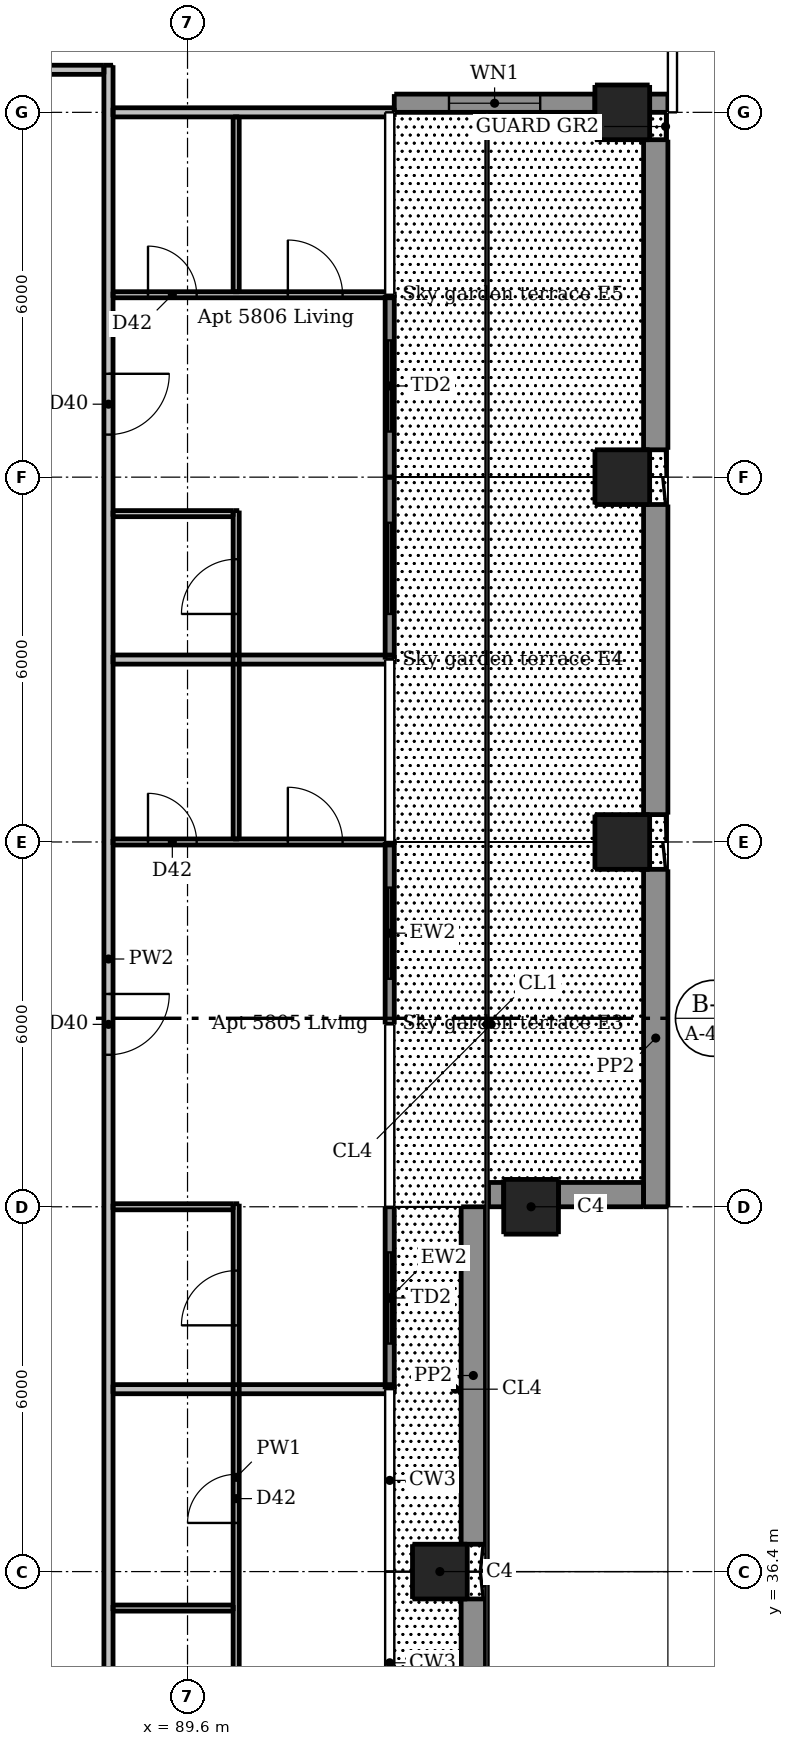
"""IFC4 building model, lengths in metres.
Left out: names, types, materials, properties, quantities, classifications, styles, units other than length and angle.
Written with IfcOpenShell. Run it as: python <this file> out.ifc"""

import sys

from ifc_helpers import new_model, si_unit, direction, frame, frame_2d, origin, origin_2d, place, context, subcontext, project, spatial, rectangle, extrude, element, fill, save


model = new_model("IFC4")
c1 = context("Model", 3, precision=1e-05, world=origin(), true_north=direction((0.0, 1.0)))
c2 = subcontext(c1, "Body", "Model", "MODEL_VIEW")
j1 = project(units=[si_unit("LENGTHUNIT", "METRE"), si_unit("PLANEANGLEUNIT", "RADIAN")], contexts=[c1])
p1 = place(None, origin())
s1 = spatial("IfcSite", under=j1, at=p1, CompositionType="ELEMENT")
p2 = place(p1, origin())
s2 = spatial("IfcBuilding", under=s1, at=p2, CompositionType="ELEMENT")
p3 = place(p2, frame((0.0, 0.0, 216.7)))
s3 = spatial("IfcBuildingStorey", under=s2, at=p3, CompositionType="ELEMENT", Elevation=216.7)
for number, where, z_axis, x_axis in (
    (1, (93.75, 36.4, 0.0), (0.0, 0.0, 1.0), (1.0, 0.0, 0.0)),
    (2, (95.25, 42.4, 0.0), (0.0, 0.0, 1.0), (1.0, 0.0, 0.0)),
    (3, (96.75, 48.4, 0.0), (0.0, 0.0, 1.0), (1.0, 0.0, 0.0)),
    (4, (96.75, 54.4, 0.0), (0.0, 0.0, 1.0), (1.0, 0.0, 0.0)),
):
    element("IfcColumn", number, at=place(p3, frame(where, z_axis=z_axis, x_axis=x_axis)), inside=s3, PredefinedType="COLUMN", context=c2, shape_type="SweptSolid", body=[
        extrude(rectangle(XDim=0.9, YDim=0.9, at=origin_2d()), origin(), (0.0, 0.0, 1.0), 3.3),
    ])
p4 = place(p3, frame((96.75, 60.4, 0.0), z_axis=(0.0, 0.0, 1.0), x_axis=(1.0, 0.0, 0.0)))
e5 = element("IfcColumn", 5, at=p4, inside=s3, PredefinedType="COLUMN", context=c2, shape_type="SweptSolid", body=[
    extrude(rectangle(XDim=0.9, YDim=0.9, at=origin_2d()), origin(), (0.0, 0.0, 1.0), 3.05),
])
p5 = place(p3, frame((93.0, 60.55, 0.0), z_axis=(0.0, 0.0, 1.0), x_axis=(1.0, 0.0, 0.0)))
e6 = element("IfcWall", 6, at=p5, inside=s3, PredefinedType="SOLIDWALL", context=c2, shape_type="SweptSolid", body=[
    extrude(rectangle(XDim=3.3, YDim=0.3, at=frame_2d((1.65, 0.0))), origin(), (0.0, 0.0, 1.0), 3.05),
])
p6 = place(p5, frame((0.9, 0.0, 0.9)))
e7 = element("IfcOpeningElement", 7, at=p6, cuts=e6, PredefinedType="OPENING", context=c2, shape_type="SweptSolid", body=[
    extrude(rectangle(XDim=1.5, YDim=1.5, at=frame_2d((0.75, 0.75))), frame((0.0, 0.16, 0.0), z_axis=(0.0, -1.0, 0.0), x_axis=(1.0, 0.0, 0.0)), (0.0, 0.0, 1.0), 0.32),
])
p7 = place(p3, frame((97.2, 60.55, 0.0), z_axis=(0.0, 0.0, 1.0), x_axis=(1.0, 0.0, 0.0)))
e8 = element("IfcWall", 8, at=p7, inside=s3, PredefinedType="SOLIDWALL", context=c2, shape_type="SweptSolid", body=[
    extrude(rectangle(XDim=0.3, YDim=0.3, at=frame_2d((0.15, 0.0))), origin(), (0.0, 0.0, 1.0), 3.05),
])
p8 = place(p3, frame((92.925, 39.4, 0.0), z_axis=(0.0, 0.0, 1.0), x_axis=(0.0, 1.0, 0.0)))
e9 = element("IfcWall", 9, at=p8, inside=s3, PredefinedType="SOLIDWALL", context=c2, shape_type="SweptSolid", body=[
    extrude(rectangle(XDim=3.0, YDim=0.15, at=frame_2d((1.5, 0.0))), origin(), (0.0, 0.0, 1.0), 3.05),
])
p9 = place(p8, frame((0.75, 0.0, 0.0)))
e10 = element("IfcOpeningElement", 10, at=p9, cuts=e9, PredefinedType="OPENING", context=c2, shape_type="SweptSolid", body=[
    extrude(rectangle(XDim=1.5, YDim=2.4, at=frame_2d((0.75, 1.2))), frame((0.0, 0.085, 0.0), z_axis=(0.0, -1.0, 0.0), x_axis=(1.0, 0.0, 0.0)), (0.0, 0.0, 1.0), 0.17),
])
p10 = place(p3, frame((92.925, 45.4, 0.0), z_axis=(0.0, 0.0, 1.0), x_axis=(0.0, 1.0, 0.0)))
e11 = element("IfcWall", 11, at=p10, inside=s3, PredefinedType="SOLIDWALL", context=c2, shape_type="SweptSolid", body=[
    extrude(rectangle(XDim=3.0, YDim=0.15, at=frame_2d((1.5, 0.0))), origin(), (0.0, 0.0, 1.0), 3.05),
])
p11 = place(p10, frame((0.75, 0.0, 0.0)))
e12 = element("IfcOpeningElement", 12, at=p11, cuts=e11, PredefinedType="OPENING", context=c2, shape_type="SweptSolid", body=[
    extrude(rectangle(XDim=1.5, YDim=2.4, at=frame_2d((0.75, 1.2))), frame((0.0, 0.085, 0.0), z_axis=(0.0, -1.0, 0.0), x_axis=(1.0, 0.0, 0.0)), (0.0, 0.0, 1.0), 0.17),
])
p12 = place(p3, frame((92.925, 51.4, 0.0), z_axis=(0.0, 0.0, 1.0), x_axis=(0.0, 1.0, 0.0)))
e13 = element("IfcWall", 13, at=p12, inside=s3, PredefinedType="SOLIDWALL", context=c2, shape_type="SweptSolid", body=[
    extrude(rectangle(XDim=3.0, YDim=0.15, at=frame_2d((1.5, 0.0))), origin(), (0.0, 0.0, 1.0), 3.05),
])
p13 = place(p12, frame((0.75, 0.0, 0.0)))
e14 = element("IfcOpeningElement", 14, at=p13, cuts=e13, PredefinedType="OPENING", context=c2, shape_type="SweptSolid", body=[
    extrude(rectangle(XDim=1.5, YDim=2.4, at=frame_2d((0.75, 1.2))), frame((0.0, 0.085, 0.0), z_axis=(0.0, -1.0, 0.0), x_axis=(1.0, 0.0, 0.0)), (0.0, 0.0, 1.0), 0.17),
])
p14 = place(p3, frame((92.925, 54.4, 0.0), z_axis=(0.0, 0.0, 1.0), x_axis=(0.0, 1.0, 0.0)))
e15 = element("IfcWall", 15, at=p14, inside=s3, PredefinedType="SOLIDWALL", context=c2, shape_type="SweptSolid", body=[
    extrude(rectangle(XDim=3.0, YDim=0.15, at=frame_2d((1.5, 0.0))), origin(), (0.0, 0.0, 1.0), 3.05),
])
p15 = place(p14, frame((0.75, 0.0, 0.0)))
e16 = element("IfcOpeningElement", 16, at=p15, cuts=e15, PredefinedType="OPENING", context=c2, shape_type="SweptSolid", body=[
    extrude(rectangle(XDim=1.5, YDim=2.4, at=frame_2d((0.75, 1.2))), frame((0.0, 0.085, 0.0), z_axis=(0.0, -1.0, 0.0), x_axis=(1.0, 0.0, 0.0)), (0.0, 0.0, 1.0), 0.17),
])
p16 = place(p3, frame((94.3, 30.85, 0.03), z_axis=(0.0, 0.0, 1.0), x_axis=(0.0, 1.0, 0.0)))
e17 = element("IfcWall", 17, at=p16, inside=s3, PredefinedType="PARAPET", context=c2, shape_type="SweptSolid", body=[
    extrude(rectangle(XDim=5.1, YDim=0.4, at=frame_2d((2.55, 0.0))), origin(), (0.0, 0.0, 1.0), 1.1),
])
p17 = place(p3, frame((94.3, 36.85, 0.03), z_axis=(0.0, 0.0, 1.0), x_axis=(0.0, 1.0, 0.0)))
e18 = element("IfcWall", 18, at=p17, inside=s3, PredefinedType="PARAPET", context=c2, shape_type="SweptSolid", body=[
    extrude(rectangle(XDim=5.55, YDim=0.4, at=frame_2d((2.775, 0.0))), origin(), (0.0, 0.0, 1.0), 1.1),
])
p18 = place(p3, frame((97.3, 42.4, 0.03), z_axis=(0.0, 0.0, 1.0), x_axis=(0.0, 1.0, 0.0)))
e19 = element("IfcWall", 19, at=p18, inside=s3, PredefinedType="PARAPET", context=c2, shape_type="SweptSolid", body=[
    extrude(rectangle(XDim=5.55, YDim=0.4, at=frame_2d((2.775, 0.0))), origin(), (0.0, 0.0, 1.0), 1.1),
])
p19 = place(p3, frame((94.55, 42.6, 0.03), z_axis=(0.0, 0.0, 1.0), x_axis=(1.0, 0.0, 0.0)))
e20 = element("IfcWall", 20, at=p19, inside=s3, PredefinedType="PARAPET", context=c2, shape_type="SweptSolid", body=[
    extrude(rectangle(XDim=0.25, YDim=0.4, at=frame_2d((0.125, 0.0))), origin(), (0.0, 0.0, 1.0), 1.1),
])
p20 = place(p3, frame((95.7, 42.6, 0.03), z_axis=(0.0, 0.0, 1.0), x_axis=(1.0, 0.0, 0.0)))
e21 = element("IfcWall", 21, at=p20, inside=s3, PredefinedType="PARAPET", context=c2, shape_type="SweptSolid", body=[
    extrude(rectangle(XDim=1.4, YDim=0.4, at=frame_2d((0.7, 0.0))), origin(), (0.0, 0.0, 1.0), 1.1),
])
for number, where, z_axis, x_axis in (
    (22, (97.3, 48.85, 0.03), (0.0, 0.0, 1.0), (0.0, 1.0, 0.0)),
    (23, (97.3, 54.85, 0.03), (0.0, 0.0, 1.0), (0.0, 1.0, 0.0)),
):
    element("IfcWall", number, at=place(p3, frame(where, z_axis=z_axis, x_axis=x_axis)), inside=s3, PredefinedType="PARAPET", context=c2, shape_type="SweptSolid", body=[
        extrude(rectangle(XDim=5.1, YDim=0.4, at=frame_2d((2.55, 0.0))), origin(), (0.0, 0.0, 1.0), 1.1),
    ])
p21 = place(p3, frame((90.4, 33.45, 0.0), z_axis=(0.0, 0.0, 1.0), x_axis=(0.0, 1.0, 0.0)))
e24 = element("IfcWall", 24, at=p21, inside=s3, PredefinedType="PARTITIONING", context=c2, shape_type="SweptSolid", body=[
    extrude(rectangle(XDim=9.0, YDim=0.1, at=frame_2d((4.5, 0.0))), origin(), (0.0, 0.0, 1.0), 3.05),
])
p22 = place(p21, frame((3.75, 0.0, 0.0)))
e25 = element("IfcOpeningElement", 25, at=p22, cuts=e24, PredefinedType="OPENING", context=c2, shape_type="SweptSolid", body=[
    extrude(rectangle(XDim=0.8, YDim=2.1, at=frame_2d((0.4, 1.05))), frame((0.0, 0.06, 0.0), z_axis=(0.0, -1.0, 0.0), x_axis=(1.0, 0.0, 0.0)), (0.0, 0.0, 1.0), 0.12),
])
p23 = place(p21, frame((7.0, 0.0, 0.0)))
e26 = element("IfcOpeningElement", 26, at=p23, cuts=e24, PredefinedType="OPENING", context=c2, shape_type="SweptSolid", body=[
    extrude(rectangle(XDim=0.9, YDim=2.1, at=frame_2d((0.45, 1.05))), frame((0.0, 0.06, 0.0), z_axis=(0.0, -1.0, 0.0), x_axis=(1.0, 0.0, 0.0)), (0.0, 0.0, 1.0), 0.12),
])
p24 = place(p3, frame((90.4, 48.45, 0.0), z_axis=(0.0, 0.0, 1.0), x_axis=(0.0, 1.0, 0.0)))
e27 = element("IfcWall", 27, at=p24, inside=s3, PredefinedType="PARTITIONING", context=c2, shape_type="SweptSolid", body=[
    extrude(rectangle(XDim=5.4, YDim=0.1, at=frame_2d((2.7, 0.0))), origin(), (0.0, 0.0, 1.0), 3.05),
])
p25 = place(p24, frame((3.7, 0.0, 0.0)))
e28 = element("IfcOpeningElement", 28, at=p25, cuts=e27, PredefinedType="OPENING", context=c2, shape_type="SweptSolid", body=[
    extrude(rectangle(XDim=0.9, YDim=2.1, at=frame_2d((0.45, 1.05))), frame((0.0, 0.06, 0.0), z_axis=(0.0, -1.0, 0.0), x_axis=(1.0, 0.0, 0.0)), (0.0, 0.0, 1.0), 0.12),
])
p26 = place(p3, frame((90.4, 57.45, 0.0), z_axis=(0.0, 0.0, 1.0), x_axis=(0.0, 1.0, 0.0)))
e29 = element("IfcWall", 29, at=p26, inside=s3, PredefinedType="PARTITIONING", context=c2, shape_type="SweptSolid", body=[
    extrude(rectangle(XDim=2.875, YDim=0.1, at=frame_2d((1.438, 0.0))), origin(), (0.0, 0.0, 1.0), 3.05),
])
p27 = place(p3, frame((88.375, 57.4, 0.0), z_axis=(0.0, 0.0, 1.0), x_axis=(1.0, 0.0, 0.0)))
e30 = element("IfcWall", 30, at=p27, inside=s3, PredefinedType="PARTITIONING", context=c2, shape_type="SweptSolid", body=[
    extrude(rectangle(XDim=4.625, YDim=0.1, at=frame_2d((2.312, 0.0))), origin(), (0.0, 0.0, 1.0), 3.05),
])
p28 = place(p27, frame((2.875, 0.0, 0.0)))
e31 = element("IfcOpeningElement", 31, at=p28, cuts=e30, PredefinedType="OPENING", context=c2, shape_type="SweptSolid", body=[
    extrude(rectangle(XDim=0.9, YDim=2.1, at=frame_2d((0.45, 1.05))), frame((0.0, 0.06, 0.0), z_axis=(0.0, -1.0, 0.0), x_axis=(1.0, 0.0, 0.0)), (0.0, 0.0, 1.0), 0.12),
])
p29 = place(p27, frame((0.575, 0.0, 0.0)))
e32 = element("IfcOpeningElement", 32, at=p29, cuts=e30, PredefinedType="OPENING", context=c2, shape_type="SweptSolid", body=[
    extrude(rectangle(XDim=0.8, YDim=2.1, at=frame_2d((0.4, 1.05))), frame((0.0, 0.06, 0.0), z_axis=(0.0, -1.0, 0.0), x_axis=(1.0, 0.0, 0.0)), (0.0, 0.0, 1.0), 0.12),
])
p30 = place(p3, frame((88.375, 53.8, 0.0), z_axis=(0.0, 0.0, 1.0), x_axis=(1.0, 0.0, 0.0)))
e33 = element("IfcWall", 33, at=p30, inside=s3, PredefinedType="PARTITIONING", context=c2, shape_type="SweptSolid", body=[
    extrude(rectangle(XDim=1.975, YDim=0.1, at=frame_2d((0.988, 0.0))), origin(), (0.0, 0.0, 1.0), 3.05),
])
p31 = place(p3, frame((88.375, 48.4, 0.0), z_axis=(0.0, 0.0, 1.0), x_axis=(1.0, 0.0, 0.0)))
e34 = element("IfcWall", 34, at=p31, inside=s3, PredefinedType="PARTITIONING", context=c2, shape_type="SweptSolid", body=[
    extrude(rectangle(XDim=4.625, YDim=0.1, at=frame_2d((2.312, 0.0))), origin(), (0.0, 0.0, 1.0), 2.516),
])
p32 = place(p31, frame((2.875, 0.0, 0.0)))
e35 = element("IfcOpeningElement", 35, at=p32, cuts=e34, PredefinedType="OPENING", context=c2, shape_type="SweptSolid", body=[
    extrude(rectangle(XDim=0.9, YDim=2.1, at=frame_2d((0.45, 1.05))), frame((0.0, 0.06, 0.0), z_axis=(0.0, -1.0, 0.0), x_axis=(1.0, 0.0, 0.0)), (0.0, 0.0, 1.0), 0.12),
])
p33 = place(p31, frame((0.575, 0.0, 0.0)))
e36 = element("IfcOpeningElement", 36, at=p33, cuts=e34, PredefinedType="OPENING", context=c2, shape_type="SweptSolid", body=[
    extrude(rectangle(XDim=0.8, YDim=2.1, at=frame_2d((0.4, 1.05))), frame((0.0, 0.06, 0.0), z_axis=(0.0, -1.0, 0.0), x_axis=(1.0, 0.0, 0.0)), (0.0, 0.0, 1.0), 0.12),
])
p34 = place(p3, frame((88.375, 42.4, 0.0), z_axis=(0.0, 0.0, 1.0), x_axis=(1.0, 0.0, 0.0)))
e37 = element("IfcWall", 37, at=p34, inside=s3, PredefinedType="PARTITIONING", context=c2, shape_type="SweptSolid", body=[
    extrude(rectangle(XDim=1.975, YDim=0.1, at=frame_2d((0.988, 0.0))), origin(), (0.0, 0.0, 1.0), 2.59),
])
p35 = place(p3, frame((88.375, 35.8, 0.0), z_axis=(0.0, 0.0, 1.0), x_axis=(1.0, 0.0, 0.0)))
e38 = element("IfcWall", 38, at=p35, inside=s3, PredefinedType="PARTITIONING", context=c2, shape_type="SweptSolid", body=[
    extrude(rectangle(XDim=1.975, YDim=0.1, at=frame_2d((0.988, 0.0))), origin(), (0.0, 0.0, 1.0), 3.05),
])
p36 = place(p3, frame((88.3, 61.175, 0.0), z_axis=(0.0, 0.0, 1.0), x_axis=(0.0, -1.0, 0.0)))
e39 = element("IfcWall", 39, at=p36, inside=s3, PredefinedType="PARTITIONING", context=c2, shape_type="SweptSolid", body=[
    extrude(rectangle(XDim=29.4, YDim=0.15, at=frame_2d((14.7, 0.0))), origin(), (0.0, 0.0, 1.0), 3.05),
])
p37 = place(p36, frame((28.125, 0.0, 0.0)))
e40 = element("IfcOpeningElement", 40, at=p37, cuts=e39, PredefinedType="OPENING", context=c2, shape_type="SweptSolid", body=[
    extrude(rectangle(XDim=1.0, YDim=2.1, at=frame_2d((0.5, 1.05))), frame((0.0, 0.085, 0.0), z_axis=(0.0, -1.0, 0.0), x_axis=(1.0, 0.0, 0.0)), (0.0, 0.0, 1.0), 0.17),
])
p38 = place(p36, frame((15.275, 0.0, 0.0)))
e41 = element("IfcOpeningElement", 41, at=p38, cuts=e39, PredefinedType="OPENING", context=c2, shape_type="SweptSolid", body=[
    extrude(rectangle(XDim=1.0, YDim=2.1, at=frame_2d((0.5, 1.05))), frame((0.0, 0.085, 0.0), z_axis=(0.0, -1.0, 0.0), x_axis=(1.0, 0.0, 0.0)), (0.0, 0.0, 1.0), 0.17),
])
p39 = place(p36, frame((5.075, 0.0, 0.0)))
e42 = element("IfcOpeningElement", 42, at=p39, cuts=e39, PredefinedType="OPENING", context=c2, shape_type="SweptSolid", body=[
    extrude(rectangle(XDim=1.0, YDim=2.1, at=frame_2d((0.5, 1.05))), frame((0.0, 0.085, 0.0), z_axis=(0.0, -1.0, 0.0), x_axis=(1.0, 0.0, 0.0)), (0.0, 0.0, 1.0), 0.17),
])
p40 = place(p3, frame((58.975, 61.1, 0.0), z_axis=(0.0, 0.0, 1.0), x_axis=(1.0, 0.0, 0.0)))
e43 = element("IfcWall", 43, at=p40, inside=s3, PredefinedType="PARTITIONING", context=c2, shape_type="SweptSolid", body=[
    extrude(rectangle(XDim=29.25, YDim=0.15, at=frame_2d((14.625, 0.0))), origin(), (0.0, 0.0, 1.0), 3.05),
])
p41 = place(p40, frame((7.925, 0.0, 0.0)))
e44 = element("IfcOpeningElement", 44, at=p41, cuts=e43, PredefinedType="OPENING", context=c2, shape_type="SweptSolid", body=[
    extrude(rectangle(XDim=1.0, YDim=2.1, at=frame_2d((0.5, 1.05))), frame((0.0, 0.085, 0.0), z_axis=(0.0, -1.0, 0.0), x_axis=(1.0, 0.0, 0.0)), (0.0, 0.0, 1.0), 0.17),
])
p42 = place(p40, frame((26.475, 0.0, 0.0)))
e45 = element("IfcOpeningElement", 45, at=p42, cuts=e43, PredefinedType="OPENING", context=c2, shape_type="SweptSolid", body=[
    extrude(rectangle(XDim=1.0, YDim=2.1, at=frame_2d((0.5, 1.05))), frame((0.0, 0.085, 0.0), z_axis=(0.0, -1.0, 0.0), x_axis=(1.0, 0.0, 0.0)), (0.0, 0.0, 1.0), 0.17),
])
p43 = place(p3, frame((88.375, 60.4, 0.0), z_axis=(0.0, 0.0, 1.0), x_axis=(1.0, 0.0, 0.0)))
e46 = element("IfcWall", 46, at=p43, inside=s3, PredefinedType="PARTITIONING", context=c2, shape_type="SweptSolid", body=[
    extrude(rectangle(XDim=4.625, YDim=0.15, at=frame_2d((2.312, 0.0))), origin(), (0.0, 0.0, 1.0), 2.59),
])
for number, where, z_axis, x_axis in (
    (47, (88.375, 51.4, 0.0), (0.0, 0.0, 1.0), (1.0, 0.0, 0.0)),
    (48, (88.375, 39.4, 0.0), (0.0, 0.0, 1.0), (1.0, 0.0, 0.0)),
):
    element("IfcWall", number, at=place(p3, frame(where, z_axis=z_axis, x_axis=x_axis)), inside=s3, PredefinedType="PARTITIONING", context=c2, shape_type="SweptSolid", body=[
        extrude(rectangle(XDim=4.625, YDim=0.15, at=frame_2d((2.312, 0.0))), origin(), (0.0, 0.0, 1.0), 3.05),
    ])
p44 = place(p6, origin())
e49 = element("IfcWindow", 49, at=p44, inside=s3, PartitioningType="DOUBLE_PANEL_VERTICAL", PredefinedType="WINDOW", context=c2, shape_type="SweptSolid", body=[
    extrude(rectangle(XDim=1.5, YDim=1.5, at=frame_2d((0.75, 0.75))), frame((0.0, 0.03, 0.0), z_axis=(0.0, -1.0, 0.0), x_axis=(1.0, 0.0, 0.0)), (0.0, 0.0, 1.0), 0.06),
])
fill(e7, e49)
p45 = place(p9, origin())
e50 = element("IfcDoor", 50, at=p45, inside=s3, OperationType="DOUBLE_DOOR_SLIDING", PredefinedType="DOOR", context=c2, shape_type="SweptSolid", body=[
    extrude(rectangle(XDim=1.5, YDim=2.4, at=frame_2d((0.75, 1.2))), frame((0.0, 0.025, 0.0), z_axis=(0.0, -1.0, 0.0), x_axis=(1.0, 0.0, 0.0)), (0.0, 0.0, 1.0), 0.05),
])
fill(e10, e50)
p46 = place(p11, origin())
e51 = element("IfcDoor", 51, at=p46, inside=s3, OperationType="DOUBLE_DOOR_SLIDING", PredefinedType="DOOR", context=c2, shape_type="SweptSolid", body=[
    extrude(rectangle(XDim=1.5, YDim=2.4, at=frame_2d((0.75, 1.2))), frame((0.0, 0.025, 0.0), z_axis=(0.0, -1.0, 0.0), x_axis=(1.0, 0.0, 0.0)), (0.0, 0.0, 1.0), 0.05),
])
fill(e12, e51)
p47 = place(p13, origin())
e52 = element("IfcDoor", 52, at=p47, inside=s3, OperationType="DOUBLE_DOOR_SLIDING", PredefinedType="DOOR", context=c2, shape_type="SweptSolid", body=[
    extrude(rectangle(XDim=1.5, YDim=2.4, at=frame_2d((0.75, 1.2))), frame((0.0, 0.025, 0.0), z_axis=(0.0, -1.0, 0.0), x_axis=(1.0, 0.0, 0.0)), (0.0, 0.0, 1.0), 0.05),
])
fill(e14, e52)
p48 = place(p15, origin())
e53 = element("IfcDoor", 53, at=p48, inside=s3, OperationType="DOUBLE_DOOR_SLIDING", PredefinedType="DOOR", context=c2, shape_type="SweptSolid", body=[
    extrude(rectangle(XDim=1.5, YDim=2.4, at=frame_2d((0.75, 1.2))), frame((0.0, 0.025, 0.0), z_axis=(0.0, -1.0, 0.0), x_axis=(1.0, 0.0, 0.0)), (0.0, 0.0, 1.0), 0.05),
])
fill(e16, e53)
p49 = place(p22, origin())
e54 = element("IfcDoor", 54, at=p49, inside=s3, OperationType="SINGLE_SWING_LEFT", PredefinedType="DOOR", context=c2, shape_type="SweptSolid", body=[
    extrude(rectangle(XDim=0.8, YDim=2.1, at=frame_2d((0.4, 1.05))), frame((0.0, 0.025, 0.0), z_axis=(0.0, -1.0, 0.0), x_axis=(1.0, 0.0, 0.0)), (0.0, 0.0, 1.0), 0.05),
])
fill(e25, e54)
p50 = place(p38, origin())
e55 = element("IfcDoor", 55, at=p50, inside=s3, OperationType="SINGLE_SWING_LEFT", PredefinedType="DOOR", context=c2, shape_type="SweptSolid", body=[
    extrude(rectangle(XDim=1.0, YDim=2.1, at=frame_2d((0.5, 1.05))), frame((0.0, 0.025, 0.0), z_axis=(0.0, -1.0, 0.0), x_axis=(1.0, 0.0, 0.0)), (0.0, 0.0, 1.0), 0.05),
])
fill(e41, e55)
p51 = place(p23, origin())
e56 = element("IfcDoor", 56, at=p51, inside=s3, OperationType="SINGLE_SWING_LEFT", PredefinedType="DOOR", context=c2, shape_type="SweptSolid", body=[
    extrude(rectangle(XDim=0.9, YDim=2.1, at=frame_2d((0.45, 1.05))), frame((0.0, 0.025, 0.0), z_axis=(0.0, -1.0, 0.0), x_axis=(1.0, 0.0, 0.0)), (0.0, 0.0, 1.0), 0.05),
])
fill(e26, e56)
p52 = place(p32, origin())
e57 = element("IfcDoor", 57, at=p52, inside=s3, OperationType="SINGLE_SWING_LEFT", PredefinedType="DOOR", context=c2, shape_type="SweptSolid", body=[
    extrude(rectangle(XDim=0.9, YDim=2.1, at=frame_2d((0.45, 1.05))), frame((0.0, 0.025, 0.0), z_axis=(0.0, -1.0, 0.0), x_axis=(1.0, 0.0, 0.0)), (0.0, 0.0, 1.0), 0.05),
])
fill(e35, e57)
p53 = place(p33, origin())
e58 = element("IfcDoor", 58, at=p53, inside=s3, OperationType="SINGLE_SWING_LEFT", PredefinedType="DOOR", context=c2, shape_type="SweptSolid", body=[
    extrude(rectangle(XDim=0.8, YDim=2.1, at=frame_2d((0.4, 1.05))), frame((0.0, 0.025, 0.0), z_axis=(0.0, -1.0, 0.0), x_axis=(1.0, 0.0, 0.0)), (0.0, 0.0, 1.0), 0.05),
])
fill(e36, e58)
p54 = place(p39, origin())
e59 = element("IfcDoor", 59, at=p54, inside=s3, OperationType="SINGLE_SWING_LEFT", PredefinedType="DOOR", context=c2, shape_type="SweptSolid", body=[
    extrude(rectangle(XDim=1.0, YDim=2.1, at=frame_2d((0.5, 1.05))), frame((0.0, 0.025, 0.0), z_axis=(0.0, -1.0, 0.0), x_axis=(1.0, 0.0, 0.0)), (0.0, 0.0, 1.0), 0.05),
])
fill(e42, e59)
p55 = place(p25, origin())
e60 = element("IfcDoor", 60, at=p55, inside=s3, OperationType="SINGLE_SWING_LEFT", PredefinedType="DOOR", context=c2, shape_type="SweptSolid", body=[
    extrude(rectangle(XDim=0.9, YDim=2.1, at=frame_2d((0.45, 1.05))), frame((0.0, 0.025, 0.0), z_axis=(0.0, -1.0, 0.0), x_axis=(1.0, 0.0, 0.0)), (0.0, 0.0, 1.0), 0.05),
])
fill(e28, e60)
p56 = place(p28, origin())
e61 = element("IfcDoor", 61, at=p56, inside=s3, OperationType="SINGLE_SWING_LEFT", PredefinedType="DOOR", context=c2, shape_type="SweptSolid", body=[
    extrude(rectangle(XDim=0.9, YDim=2.1, at=frame_2d((0.45, 1.05))), frame((0.0, 0.025, 0.0), z_axis=(0.0, -1.0, 0.0), x_axis=(1.0, 0.0, 0.0)), (0.0, 0.0, 1.0), 0.05),
])
fill(e31, e61)
p57 = place(p29, origin())
e62 = element("IfcDoor", 62, at=p57, inside=s3, OperationType="SINGLE_SWING_LEFT", PredefinedType="DOOR", context=c2, shape_type="SweptSolid", body=[
    extrude(rectangle(XDim=0.8, YDim=2.1, at=frame_2d((0.4, 1.05))), frame((0.0, 0.025, 0.0), z_axis=(0.0, -1.0, 0.0), x_axis=(1.0, 0.0, 0.0)), (0.0, 0.0, 1.0), 0.05),
])
fill(e32, e62)
save(model, sys.argv[1])
